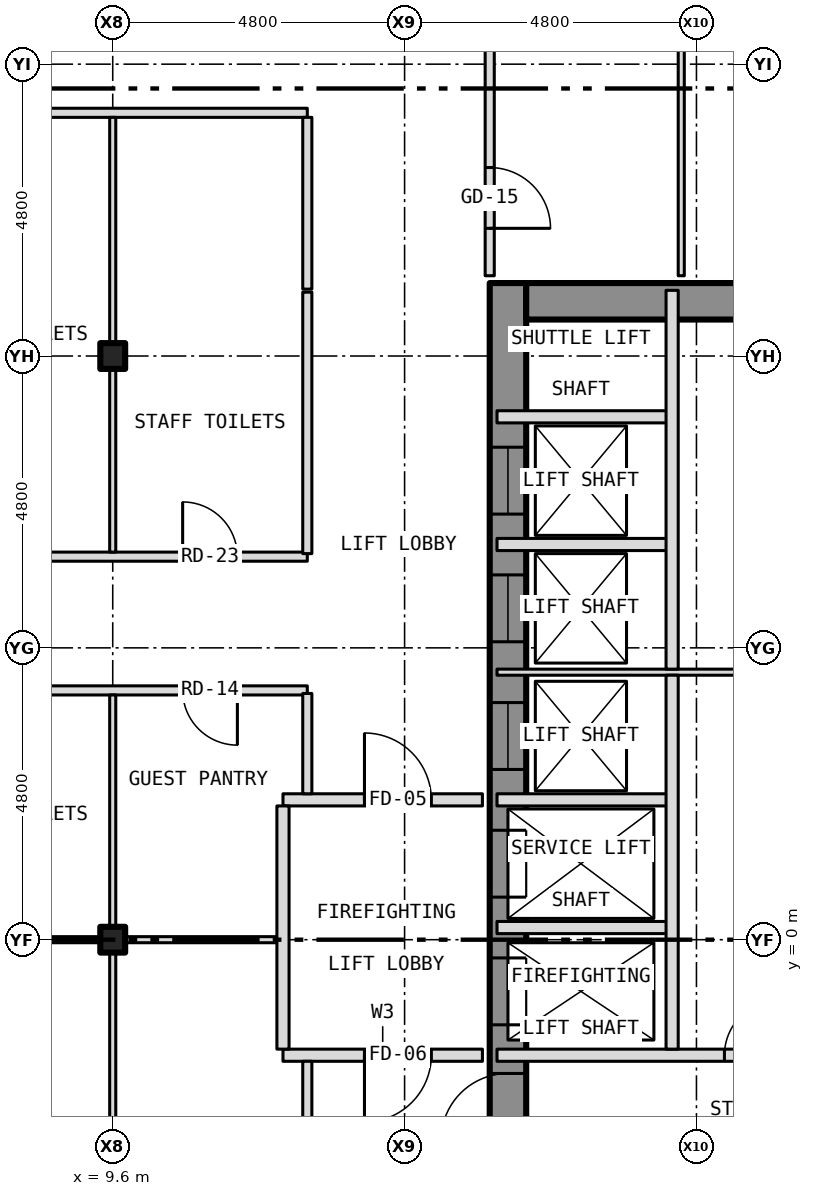
"""IFC4 building model, lengths in metres.
Left out: names, types, materials, properties, quantities, classifications, styles, units other than length and angle.
Written with IfcOpenShell. Run it as: python <this file> out.ifc"""

import sys

from ifc_helpers import new_model, si_unit, direction, frame, frame_2d, origin, origin_2d, place, context, subcontext, project, spatial, rectangle, i_section, extrude, element, fill, save


model = new_model("IFC4")
c1 = context("Model", 3, precision=1e-05, world=origin(), true_north=direction((0.0, 1.0)))
c2 = subcontext(c1, "Body", "Model", "MODEL_VIEW")
j1 = project(units=[si_unit("LENGTHUNIT", "METRE"), si_unit("PLANEANGLEUNIT", "RADIAN")], contexts=[c1])
p1 = place(None, origin())
s1 = spatial("IfcSite", under=j1, at=p1, CompositionType="ELEMENT")
p2 = place(p1, origin())
s2 = spatial("IfcBuilding", under=s1, at=p2, CompositionType="ELEMENT")
p3 = place(p2, frame((0.0, 0.0, 56.5)))
s3 = spatial("IfcBuildingStorey", under=s2, at=p3, CompositionType="ELEMENT", Elevation=56.5)
for number, where, z_axis, x_axis in (
    (1, (9.6, 0.0, -0.15), (0.0, 0.0, 1.0), (1.0, 0.0, 0.0)),
    (2, (9.6, 9.6, -0.15), (0.0, 0.0, 1.0), (1.0, 0.0, 0.0)),
):
    element("IfcColumn", number, at=place(p3, frame(where, z_axis=z_axis, x_axis=x_axis)), inside=s3, PredefinedType="COLUMN", context=c2, shape_type="SweptSolid", body=[
        extrude(i_section(OverallWidth=0.409, OverallDepth=0.424, WebThickness=0.033, FlangeThickness=0.052, at=origin_2d()), origin(), (0.0, 0.0, 1.0), 3.5),
    ])
p4 = place(p3, frame((16.1, -10.8, 0.0), z_axis=(0.0, 0.0, 1.0), x_axis=(0.0, 1.0, 0.0)))
e3 = element("IfcWall", 3, at=p4, inside=s3, PredefinedType="SHEAR", context=c2, shape_type="SweptSolid", body=[
    extrude(rectangle(XDim=21.6, YDim=0.6, at=frame_2d((10.8, 0.0))), origin(), (0.0, 0.0, 1.0), 3.25),
])
p5 = place(p4, frame((9.4, 0.0, 0.0)))
e4 = element("IfcOpeningElement", 4, at=p5, cuts=e3, PredefinedType="OPENING", context=c2, shape_type="SweptSolid", body=[
    extrude(rectangle(XDim=1.1, YDim=2.1, at=frame_2d((0.55, 1.05))), frame((0.0, 0.312, 0.0), z_axis=(0.0, -1.0, 0.0), x_axis=(1.0, 0.0, 0.0)), (0.0, 0.0, 1.0), 0.624),
])
p6 = place(p4, frame((11.5, 0.0, 0.0)))
e5 = element("IfcOpeningElement", 5, at=p6, cuts=e3, PredefinedType="OPENING", context=c2, shape_type="SweptSolid", body=[
    extrude(rectangle(XDim=1.1, YDim=2.1, at=frame_2d((0.55, 1.05))), frame((0.0, 0.312, 0.0), z_axis=(0.0, -1.0, 0.0), x_axis=(1.0, 0.0, 0.0)), (0.0, 0.0, 1.0), 0.624),
])
p7 = place(p4, frame((13.6, 0.0, 0.0)))
e6 = element("IfcOpeningElement", 6, at=p7, cuts=e3, PredefinedType="OPENING", context=c2, shape_type="SweptSolid", body=[
    extrude(rectangle(XDim=1.1, YDim=2.1, at=frame_2d((0.55, 1.05))), frame((0.0, 0.312, 0.0), z_axis=(0.0, -1.0, 0.0), x_axis=(1.0, 0.0, 0.0)), (0.0, 0.0, 1.0), 0.624),
])
p8 = place(p4, frame((15.7, 0.0, 0.0)))
e7 = element("IfcOpeningElement", 7, at=p8, cuts=e3, PredefinedType="OPENING", context=c2, shape_type="SweptSolid", body=[
    extrude(rectangle(XDim=1.1, YDim=2.1, at=frame_2d((0.55, 1.05))), frame((0.0, 0.312, 0.0), z_axis=(0.0, -1.0, 0.0), x_axis=(1.0, 0.0, 0.0)), (0.0, 0.0, 1.0), 0.624),
])
p9 = place(p4, frame((17.8, 0.0, 0.0)))
e8 = element("IfcOpeningElement", 8, at=p9, cuts=e3, PredefinedType="OPENING", context=c2, shape_type="SweptSolid", body=[
    extrude(rectangle(XDim=1.1, YDim=2.1, at=frame_2d((0.55, 1.05))), frame((0.0, 0.312, 0.0), z_axis=(0.0, -1.0, 0.0), x_axis=(1.0, 0.0, 0.0)), (0.0, 0.0, 1.0), 0.624),
])
p10 = place(p4, frame((5.642, 0.0, 0.0)))
e9 = element("IfcOpeningElement", 9, at=p10, cuts=e3, PredefinedType="OPENING", context=c2, shape_type="SweptSolid", body=[
    extrude(rectangle(XDim=1.1, YDim=2.1, at=frame_2d((0.55, 1.05))), frame((0.0, 0.312, 0.0), z_axis=(0.0, -1.0, 0.0), x_axis=(1.0, 0.0, 0.0)), (0.0, 0.0, 1.0), 0.624),
])
p11 = place(p4, frame((7.5, 0.0, 0.0)))
e10 = element("IfcOpeningElement", 10, at=p11, cuts=e3, PredefinedType="OPENING", context=c2, shape_type="SweptSolid", body=[
    extrude(rectangle(XDim=1.1, YDim=2.1, at=frame_2d((0.55, 1.05))), frame((0.0, 0.312, 0.0), z_axis=(0.0, -1.0, 0.0), x_axis=(1.0, 0.0, 0.0)), (0.0, 0.0, 1.0), 0.624),
])
p12 = place(p3, frame((16.4, 10.5, 0.0), z_axis=(0.0, 0.0, 1.0), x_axis=(1.0, 0.0, 0.0)))
e11 = element("IfcWall", 11, at=p12, inside=s3, PredefinedType="SHEAR", context=c2, shape_type="SweptSolid", body=[
    extrude(rectangle(XDim=7.0, YDim=0.6, at=frame_2d((3.5, 0.0))), origin(), (0.0, 0.0, 1.0), 3.25),
])
p13 = place(p3, frame((12.4, -1.9, 0.0), z_axis=(0.0, 0.0, 1.0), x_axis=(1.0, 0.0, 0.0)))
e12 = element("IfcWall", 12, at=p13, inside=s3, PredefinedType="PARTITIONING", context=c2, shape_type="SweptSolid", body=[
    extrude(rectangle(XDim=3.28, YDim=0.2, at=frame_2d((1.64, 0.0))), origin(), (0.0, 0.0, 1.0), 3.35),
])
p14 = place(p13, frame((1.34, 0.0, 0.0)))
e13 = element("IfcOpeningElement", 13, at=p14, cuts=e12, PredefinedType="OPENING", context=c2, shape_type="SweptSolid", body=[
    extrude(rectangle(XDim=1.1, YDim=2.1, at=frame_2d((0.55, 1.05))), frame((0.0, 0.112, 0.0), z_axis=(0.0, -1.0, 0.0), x_axis=(1.0, 0.0, 0.0)), (0.0, 0.0, 1.0), 0.224),
])
p15 = place(p3, frame((15.92, -1.9, 0.0), z_axis=(0.0, 0.0, 1.0), x_axis=(1.0, 0.0, 0.0)))
e14 = element("IfcWall", 14, at=p15, inside=s3, PredefinedType="PARTITIONING", context=c2, shape_type="SweptSolid", body=[
    extrude(rectangle(XDim=7.96, YDim=0.2, at=frame_2d((3.98, 0.0))), origin(), (0.0, 0.0, 1.0), 3.25),
])
p16 = place(p15, frame((3.74, 0.0, 0.0)))
e15 = element("IfcOpeningElement", 15, at=p16, cuts=e14, PredefinedType="OPENING", context=c2, shape_type="SweptSolid", body=[
    extrude(rectangle(XDim=0.9, YDim=2.1, at=frame_2d((0.45, 1.05))), frame((0.0, 0.112, 0.0), z_axis=(0.0, -1.0, 0.0), x_axis=(1.0, 0.0, 0.0)), (0.0, 0.0, 1.0), 0.224),
])
p17 = place(p3, frame((6.3, 0.0, 0.0), z_axis=(0.0, 0.0, 1.0), x_axis=(1.0, 0.0, 0.0)))
e16 = element("IfcWall", 16, at=p17, inside=s3, PredefinedType="PARTITIONING", context=c2, shape_type="SweptSolid", body=[
    extrude(rectangle(XDim=3.096, YDim=0.1, at=frame_2d((1.548, 0.0))), origin(), (0.0, 0.0, 1.0), 2.728),
])
p18 = place(p3, frame((9.396, 0.0, 0.0), z_axis=(0.0, 0.0, 1.0), x_axis=(1.0, 0.0, 0.0)))
e17 = element("IfcWall", 17, at=p18, inside=s3, PredefinedType="PARTITIONING", context=c2, shape_type="SweptSolid", body=[
    extrude(rectangle(XDim=0.408, YDim=0.1, at=frame_2d((0.204, 0.0))), origin(), (0.0, 0.0, 1.0), 3.35),
])
p19 = place(p3, frame((9.804, 0.0, 0.0), z_axis=(0.0, 0.0, 1.0), x_axis=(1.0, 0.0, 0.0)))
e18 = element("IfcWall", 18, at=p19, inside=s3, PredefinedType="PARTITIONING", context=c2, shape_type="SweptSolid", body=[
    extrude(rectangle(XDim=2.596, YDim=0.1, at=frame_2d((1.298, 0.0))), origin(), (0.0, 0.0, 1.0), 2.728),
])
p20 = place(p3, frame((15.92, 0.2, 0.0), z_axis=(0.0, 0.0, 1.0), x_axis=(1.0, 0.0, 0.0)))
e19 = element("IfcWall", 19, at=p20, inside=s3, PredefinedType="PARTITIONING", context=c2, shape_type="SweptSolid", body=[
    extrude(rectangle(XDim=2.88, YDim=0.2, at=frame_2d((1.44, 0.0))), origin(), (0.0, 0.0, 1.0), 3.25),
])
p21 = place(p3, frame((12.4, 2.3, 0.0), z_axis=(0.0, 0.0, 1.0), x_axis=(1.0, 0.0, 0.0)))
e20 = element("IfcWall", 20, at=p21, inside=s3, PredefinedType="PARTITIONING", context=c2, shape_type="SweptSolid", body=[
    extrude(rectangle(XDim=3.28, YDim=0.2, at=frame_2d((1.64, 0.0))), origin(), (0.0, 0.0, 1.0), 3.35),
])
p22 = place(p21, frame((1.34, 0.0, 0.0)))
e21 = element("IfcOpeningElement", 21, at=p22, cuts=e20, PredefinedType="OPENING", context=c2, shape_type="SweptSolid", body=[
    extrude(rectangle(XDim=1.1, YDim=2.1, at=frame_2d((0.55, 1.05))), frame((0.0, 0.112, 0.0), z_axis=(0.0, -1.0, 0.0), x_axis=(1.0, 0.0, 0.0)), (0.0, 0.0, 1.0), 0.224),
])
p23 = place(p3, frame((15.92, 2.3, 0.0), z_axis=(0.0, 0.0, 1.0), x_axis=(1.0, 0.0, 0.0)))
e22 = element("IfcWall", 22, at=p23, inside=s3, PredefinedType="PARTITIONING", context=c2, shape_type="SweptSolid", body=[
    extrude(rectangle(XDim=2.88, YDim=0.2, at=frame_2d((1.44, 0.0))), origin(), (0.0, 0.0, 1.0), 3.25),
])
p24 = place(p3, frame((6.3, 4.1, 0.0), z_axis=(0.0, 0.0, 1.0), x_axis=(1.0, 0.0, 0.0)))
e23 = element("IfcWall", 23, at=p24, inside=s3, PredefinedType="PARTITIONING", context=c2, shape_type="SweptSolid", body=[
    extrude(rectangle(XDim=6.5, YDim=0.15, at=frame_2d((3.25, 0.0))), origin(), (0.0, 0.0, 1.0), 3.35),
])
p25 = place(p24, frame((4.45, 0.0, 0.0)))
e24 = element("IfcOpeningElement", 24, at=p25, cuts=e23, PredefinedType="OPENING", context=c2, shape_type="SweptSolid", body=[
    extrude(rectangle(XDim=0.9, YDim=2.1, at=frame_2d((0.45, 1.05))), frame((0.0, 0.087, 0.0), z_axis=(0.0, -1.0, 0.0), x_axis=(1.0, 0.0, 0.0)), (0.0, 0.0, 1.0), 0.174),
])
p26 = place(p3, frame((15.92, 4.4, 0.0), z_axis=(0.0, 0.0, 1.0), x_axis=(1.0, 0.0, 0.0)))
e25 = element("IfcWall", 25, at=p26, inside=s3, PredefinedType="PARTITIONING", context=c2, shape_type="SweptSolid", body=[
    extrude(rectangle(XDim=7.96, YDim=0.1, at=frame_2d((3.98, 0.0))), origin(), (0.0, 0.0, 1.0), 3.25),
])
p27 = place(p26, frame((5.03, 0.0, 0.0)))
e26 = element("IfcOpeningElement", 26, at=p27, cuts=e25, PredefinedType="OPENING", context=c2, shape_type="SweptSolid", body=[
    extrude(rectangle(XDim=0.9, YDim=2.1, at=frame_2d((0.45, 1.05))), frame((0.0, 0.062, 0.0), z_axis=(0.0, -1.0, 0.0), x_axis=(1.0, 0.0, 0.0)), (0.0, 0.0, 1.0), 0.124),
])
p28 = place(p3, frame((6.3, 6.3, 0.0), z_axis=(0.0, 0.0, 1.0), x_axis=(1.0, 0.0, 0.0)))
e27 = element("IfcWall", 27, at=p28, inside=s3, PredefinedType="PARTITIONING", context=c2, shape_type="SweptSolid", body=[
    extrude(rectangle(XDim=6.5, YDim=0.15, at=frame_2d((3.25, 0.0))), origin(), (0.0, 0.0, 1.0), 3.35),
])
p29 = place(p28, frame((4.45, 0.0, 0.0)))
e28 = element("IfcOpeningElement", 28, at=p29, cuts=e27, PredefinedType="OPENING", context=c2, shape_type="SweptSolid", body=[
    extrude(rectangle(XDim=0.9, YDim=2.1, at=frame_2d((0.45, 1.05))), frame((0.0, 0.087, 0.0), z_axis=(0.0, -1.0, 0.0), x_axis=(1.0, 0.0, 0.0)), (0.0, 0.0, 1.0), 0.174),
])
for number, where, z_axis, x_axis in (
    (29, (15.92, 6.5, 0.0), (0.0, 0.0, 1.0), (1.0, 0.0, 0.0)),
    (30, (15.92, 8.6, 0.0), (0.0, 0.0, 1.0), (1.0, 0.0, 0.0)),
):
    element("IfcWall", number, at=place(p3, frame(where, z_axis=z_axis, x_axis=x_axis)), inside=s3, PredefinedType="PARTITIONING", context=c2, shape_type="SweptSolid", body=[
        extrude(rectangle(XDim=2.88, YDim=0.2, at=frame_2d((1.44, 0.0))), origin(), (0.0, 0.0, 1.0), 3.25),
    ])
p30 = place(p3, frame((6.3, 13.6, 0.0), z_axis=(0.0, 0.0, 1.0), x_axis=(1.0, 0.0, 0.0)))
e31 = element("IfcWall", 31, at=p30, inside=s3, PredefinedType="PARTITIONING", context=c2, shape_type="SweptSolid", body=[
    extrude(rectangle(XDim=6.5, YDim=0.15, at=frame_2d((3.25, 0.0))), origin(), (0.0, 0.0, 1.0), 3.35),
])
p31 = place(p3, frame((9.6, -9.55, 0.0), z_axis=(0.0, 0.0, 1.0), x_axis=(0.0, 1.0, 0.0)))
e32 = element("IfcWall", 32, at=p31, inside=s3, PredefinedType="PARTITIONING", context=c2, shape_type="SweptSolid", body=[
    extrude(rectangle(XDim=9.5, YDim=0.1, at=frame_2d((4.75, 0.0))), origin(), (0.0, 0.0, 1.0), 2.728),
])
p32 = place(p3, frame((9.6, 0.05, 0.0), z_axis=(0.0, 0.0, 1.0), x_axis=(0.0, 1.0, 0.0)))
e33 = element("IfcWall", 33, at=p32, inside=s3, PredefinedType="PARTITIONING", context=c2, shape_type="SweptSolid", body=[
    extrude(rectangle(XDim=3.975, YDim=0.1, at=frame_2d((1.987, 0.0))), origin(), (0.0, 0.0, 1.0), 2.728),
])
p33 = place(p3, frame((9.6, 6.375, 0.0), z_axis=(0.0, 0.0, 1.0), x_axis=(0.0, 1.0, 0.0)))
e34 = element("IfcWall", 34, at=p33, inside=s3, PredefinedType="PARTITIONING", context=c2, shape_type="SweptSolid", body=[
    extrude(rectangle(XDim=3.021, YDim=0.1, at=frame_2d((1.51, 0.0))), origin(), (0.0, 0.0, 1.0), 2.728),
])
p34 = place(p3, frame((9.6, 9.396, 0.0), z_axis=(0.0, 0.0, 1.0), x_axis=(0.0, 1.0, 0.0)))
e35 = element("IfcWall", 35, at=p34, inside=s3, PredefinedType="PARTITIONING", context=c2, shape_type="SweptSolid", body=[
    extrude(rectangle(XDim=0.408, YDim=0.1, at=frame_2d((0.204, 0.0))), origin(), (0.0, 0.0, 1.0), 3.35),
])
p35 = place(p3, frame((9.6, 9.804, 0.0), z_axis=(0.0, 0.0, 1.0), x_axis=(0.0, 1.0, 0.0)))
e36 = element("IfcWall", 36, at=p35, inside=s3, PredefinedType="PARTITIONING", context=c2, shape_type="SweptSolid", body=[
    extrude(rectangle(XDim=3.721, YDim=0.1, at=frame_2d((1.86, 0.0))), origin(), (0.0, 0.0, 1.0), 2.728),
])
p36 = place(p3, frame((12.4, -1.8, 0.0), z_axis=(0.0, 0.0, 1.0), x_axis=(0.0, 1.0, 0.0)))
e37 = element("IfcWall", 37, at=p36, inside=s3, PredefinedType="PARTITIONING", context=c2, shape_type="SweptSolid", body=[
    extrude(rectangle(XDim=4.0, YDim=0.2, at=frame_2d((2.0, 0.0))), origin(), (0.0, 0.0, 1.0), 3.35),
])
p37 = place(p3, frame((12.8, -13.525, 0.0), z_axis=(0.0, 0.0, 1.0), x_axis=(0.0, 1.0, 0.0)))
e38 = element("IfcWall", 38, at=p37, inside=s3, PredefinedType="PARTITIONING", context=c2, shape_type="SweptSolid", body=[
    extrude(rectangle(XDim=11.525, YDim=0.15, at=frame_2d((5.762, 0.0))), origin(), (0.0, 0.0, 1.0), 3.35),
])
p38 = place(p37, frame((7.325, 0.0, 0.0)))
e39 = element("IfcOpeningElement", 39, at=p38, cuts=e38, PredefinedType="OPENING", context=c2, shape_type="SweptSolid", body=[
    extrude(rectangle(XDim=0.9, YDim=2.1, at=frame_2d((0.45, 1.05))), frame((0.0, 0.087, 0.0), z_axis=(0.0, -1.0, 0.0), x_axis=(1.0, 0.0, 0.0)), (0.0, 0.0, 1.0), 0.174),
])
p39 = place(p3, frame((12.8, 2.4, 0.0), z_axis=(0.0, 0.0, 1.0), x_axis=(0.0, 1.0, 0.0)))
e40 = element("IfcWall", 40, at=p39, inside=s3, PredefinedType="PARTITIONING", context=c2, shape_type="SweptSolid", body=[
    extrude(rectangle(XDim=1.65, YDim=0.15, at=frame_2d((0.825, 0.0))), origin(), (0.0, 0.0, 1.0), 3.35),
])
p40 = place(p3, frame((12.8, 6.35, 0.0), z_axis=(0.0, 0.0, 1.0), x_axis=(0.0, 1.0, 0.0)))
e41 = element("IfcWall", 41, at=p40, inside=s3, PredefinedType="PARTITIONING", context=c2, shape_type="SweptSolid", body=[
    extrude(rectangle(XDim=4.3, YDim=0.15, at=frame_2d((2.15, 0.0))), origin(), (0.0, 0.0, 1.0), 3.35),
])
p41 = place(p3, frame((12.8, 10.7, 0.0), z_axis=(0.0, 0.0, 1.0), x_axis=(0.0, 1.0, 0.0)))
e42 = element("IfcWall", 42, at=p41, inside=s3, PredefinedType="PARTITIONING", context=c2, shape_type="SweptSolid", body=[
    extrude(rectangle(XDim=2.825, YDim=0.15, at=frame_2d((1.413, 0.0))), origin(), (0.0, 0.0, 1.0), 3.35),
])
p42 = place(p3, frame((15.8, 10.92, 0.0), z_axis=(0.0, 0.0, 1.0), x_axis=(0.0, 1.0, 0.0)))
e43 = element("IfcWall", 43, at=p42, inside=s3, PredefinedType="PARTITIONING", context=c2, shape_type="SweptSolid", body=[
    extrude(rectangle(XDim=4.805, YDim=0.15, at=frame_2d((2.403, 0.0))), origin(), (0.0, 0.0, 1.0), 3.35),
])
p43 = place(p42, frame((0.78, 0.0, 0.0)))
e44 = element("IfcOpeningElement", 44, at=p43, cuts=e43, PredefinedType="OPENING", context=c2, shape_type="SweptSolid", body=[
    extrude(rectangle(XDim=1.0, YDim=2.1, at=frame_2d((0.5, 1.05))), frame((0.0, 0.087, 0.0), z_axis=(0.0, -1.0, 0.0), x_axis=(1.0, 0.0, 0.0)), (0.0, 0.0, 1.0), 0.174),
])
p44 = place(p3, frame((18.8, -1.8, 0.0), z_axis=(0.0, 0.0, 1.0), x_axis=(0.0, 1.0, 0.0)))
e45 = element("IfcWall", 45, at=p44, inside=s3, PredefinedType="PARTITIONING", context=c2, shape_type="SweptSolid", body=[
    extrude(rectangle(XDim=6.15, YDim=0.2, at=frame_2d((3.075, 0.0))), origin(), (0.0, 0.0, 1.0), 3.25),
])
p45 = place(p3, frame((18.8, 4.45, 0.0), z_axis=(0.0, 0.0, 1.0), x_axis=(0.0, 1.0, 0.0)))
e46 = element("IfcWall", 46, at=p45, inside=s3, PredefinedType="PARTITIONING", context=c2, shape_type="SweptSolid", body=[
    extrude(rectangle(XDim=6.23, YDim=0.2, at=frame_2d((3.115, 0.0))), origin(), (0.0, 0.0, 1.0), 3.25),
])
p46 = place(p3, frame((18.95, 10.92, 0.0), z_axis=(0.0, 0.0, 1.0), x_axis=(0.0, 1.0, 0.0)))
e47 = element("IfcWall", 47, at=p46, inside=s3, PredefinedType="PARTITIONING", context=c2, shape_type="SweptSolid", body=[
    extrude(rectangle(XDim=13.61, YDim=0.1, at=frame_2d((6.805, 0.0))), origin(), (0.0, 0.0, 1.0), 3.35),
])
p47 = place(p46, frame((6.03, 0.0, 0.0)))
e48 = element("IfcOpeningElement", 48, at=p47, cuts=e47, PredefinedType="OPENING", context=c2, shape_type="SweptSolid", body=[
    extrude(rectangle(XDim=0.9, YDim=2.1, at=frame_2d((0.45, 1.05))), frame((0.0, 0.062, 0.0), z_axis=(0.0, -1.0, 0.0), x_axis=(1.0, 0.0, 0.0)), (0.0, 0.0, 1.0), 0.124),
])
p48 = place(p5, origin())
e49 = element("IfcDoor", 49, at=p48, inside=s3, OperationType="SLIDING_TO_LEFT", PredefinedType="DOOR", context=c2, shape_type="SweptSolid", body=[
    extrude(rectangle(XDim=1.1, YDim=2.1, at=frame_2d((0.55, 1.05))), frame((0.0, 0.025, 0.0), z_axis=(0.0, -1.0, 0.0), x_axis=(1.0, 0.0, 0.0)), (0.0, 0.0, 1.0), 0.05),
])
fill(e4, e49)
p49 = place(p6, origin())
e50 = element("IfcDoor", 50, at=p49, inside=s3, OperationType="SLIDING_TO_LEFT", PredefinedType="DOOR", context=c2, shape_type="SweptSolid", body=[
    extrude(rectangle(XDim=1.1, YDim=2.1, at=frame_2d((0.55, 1.05))), frame((0.0, 0.025, 0.0), z_axis=(0.0, -1.0, 0.0), x_axis=(1.0, 0.0, 0.0)), (0.0, 0.0, 1.0), 0.05),
])
fill(e5, e50)
p50 = place(p7, origin())
e51 = element("IfcDoor", 51, at=p50, inside=s3, OperationType="SLIDING_TO_LEFT", PredefinedType="DOOR", context=c2, shape_type="SweptSolid", body=[
    extrude(rectangle(XDim=1.1, YDim=2.1, at=frame_2d((0.55, 1.05))), frame((0.0, 0.025, 0.0), z_axis=(0.0, -1.0, 0.0), x_axis=(1.0, 0.0, 0.0)), (0.0, 0.0, 1.0), 0.05),
])
fill(e6, e51)
p51 = place(p8, origin())
e52 = element("IfcDoor", 52, at=p51, inside=s3, OperationType="SLIDING_TO_LEFT", PredefinedType="DOOR", context=c2, shape_type="SweptSolid", body=[
    extrude(rectangle(XDim=1.1, YDim=2.1, at=frame_2d((0.55, 1.05))), frame((0.0, 0.025, 0.0), z_axis=(0.0, -1.0, 0.0), x_axis=(1.0, 0.0, 0.0)), (0.0, 0.0, 1.0), 0.05),
])
fill(e7, e52)
p52 = place(p9, origin())
e53 = element("IfcDoor", 53, at=p52, inside=s3, OperationType="SLIDING_TO_LEFT", PredefinedType="DOOR", context=c2, shape_type="SweptSolid", body=[
    extrude(rectangle(XDim=1.1, YDim=2.1, at=frame_2d((0.55, 1.05))), frame((0.0, 0.025, 0.0), z_axis=(0.0, -1.0, 0.0), x_axis=(1.0, 0.0, 0.0)), (0.0, 0.0, 1.0), 0.05),
])
fill(e8, e53)
p53 = place(p11, origin())
e54 = element("IfcDoor", 54, at=p53, inside=s3, OperationType="SINGLE_SWING_LEFT", PredefinedType="DOOR", context=c2, shape_type="SweptSolid", body=[
    extrude(rectangle(XDim=1.1, YDim=2.1, at=frame_2d((0.55, 1.05))), frame((0.0, 0.025, 0.0), z_axis=(0.0, -1.0, 0.0), x_axis=(1.0, 0.0, 0.0)), (0.0, 0.0, 1.0), 0.05),
])
fill(e10, e54)
p54 = place(p16, origin())
e55 = element("IfcDoor", 55, at=p54, inside=s3, OperationType="SINGLE_SWING_RIGHT", PredefinedType="DOOR", context=c2, shape_type="SweptSolid", body=[
    extrude(rectangle(XDim=0.9, YDim=2.1, at=frame_2d((0.45, 1.05))), frame((0.0, 0.025, 0.0), z_axis=(0.0, -1.0, 0.0), x_axis=(1.0, 0.0, 0.0)), (0.0, 0.0, 1.0), 0.05),
])
fill(e15, e55)
p55 = place(p22, origin())
e56 = element("IfcDoor", 56, at=p55, inside=s3, OperationType="SINGLE_SWING_LEFT", PredefinedType="DOOR", context=c2, shape_type="SweptSolid", body=[
    extrude(rectangle(XDim=1.1, YDim=2.1, at=frame_2d((0.55, 1.05))), frame((0.0, 0.025, 0.0), z_axis=(0.0, -1.0, 0.0), x_axis=(1.0, 0.0, 0.0)), (0.0, 0.0, 1.0), 0.05),
])
fill(e21, e56)
p56 = place(p14, origin())
e57 = element("IfcDoor", 57, at=p56, inside=s3, OperationType="SINGLE_SWING_LEFT", PredefinedType="DOOR", context=c2, shape_type="SweptSolid", body=[
    extrude(rectangle(XDim=1.1, YDim=2.1, at=frame_2d((0.55, 1.05))), frame((0.0, 0.025, 0.0), z_axis=(0.0, -1.0, 0.0), x_axis=(1.0, 0.0, 0.0)), (0.0, 0.0, 1.0), 0.05),
])
fill(e13, e57)
p57 = place(p43, origin())
e58 = element("IfcDoor", 58, at=p57, inside=s3, OperationType="SINGLE_SWING_LEFT", PredefinedType="DOOR", context=c2, shape_type="SweptSolid", body=[
    extrude(rectangle(XDim=1.0, YDim=2.1, at=frame_2d((0.5, 1.05))), frame((0.0, 0.025, 0.0), z_axis=(0.0, -1.0, 0.0), x_axis=(1.0, 0.0, 0.0)), (0.0, 0.0, 1.0), 0.05),
])
fill(e44, e58)
p58 = place(p25, origin())
e59 = element("IfcDoor", 59, at=p58, inside=s3, OperationType="SINGLE_SWING_RIGHT", PredefinedType="DOOR", context=c2, shape_type="SweptSolid", body=[
    extrude(rectangle(XDim=0.9, YDim=2.1, at=frame_2d((0.45, 1.05))), frame((0.0, 0.025, 0.0), z_axis=(0.0, -1.0, 0.0), x_axis=(1.0, 0.0, 0.0)), (0.0, 0.0, 1.0), 0.05),
])
fill(e24, e59)
p59 = place(p29, origin())
e60 = element("IfcDoor", 60, at=p59, inside=s3, OperationType="SINGLE_SWING_LEFT", PredefinedType="DOOR", context=c2, shape_type="SweptSolid", body=[
    extrude(rectangle(XDim=0.9, YDim=2.1, at=frame_2d((0.45, 1.05))), frame((0.0, 0.025, 0.0), z_axis=(0.0, -1.0, 0.0), x_axis=(1.0, 0.0, 0.0)), (0.0, 0.0, 1.0), 0.05),
])
fill(e28, e60)
save(model, sys.argv[1])
